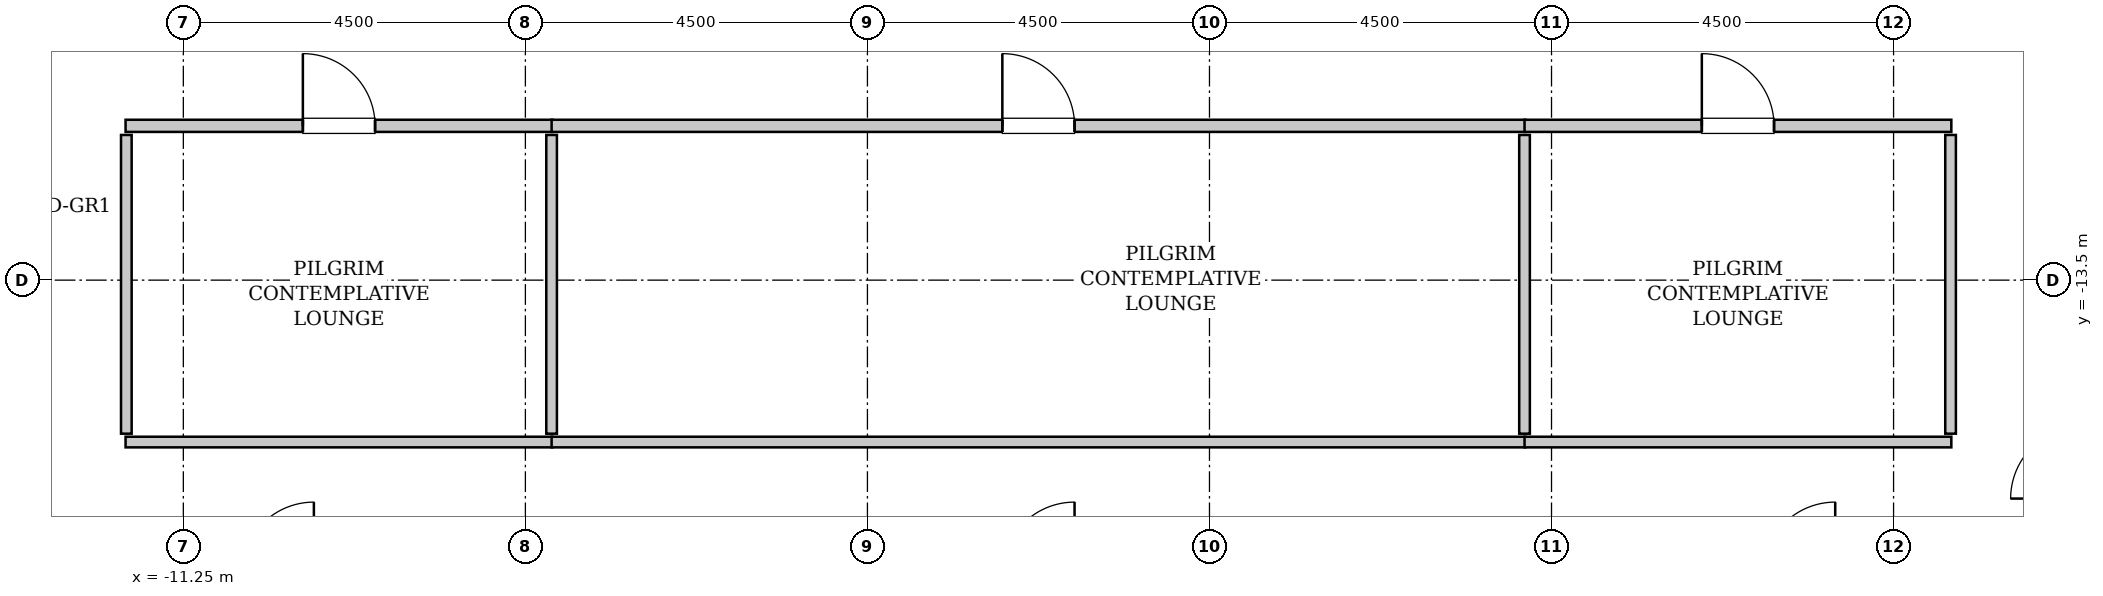
"""IFC4 building model, lengths in metres.
Left out: names, types, materials, properties, quantities, classifications, styles, units other than length and angle.
Written with IfcOpenShell. Run it as: python <this file> out.ifc"""

import sys

from ifc_helpers import new_model, si_unit, direction, frame, frame_2d, origin, place, context, subcontext, project, spatial, rectangle, extrude, source, transform, mapped, element, fill, save


model = new_model("IFC4")
c1 = context("Model", 3, precision=1e-05, world=origin(), true_north=direction((0.0, 1.0)))
c2 = subcontext(c1, "Body", "Model", "MODEL_VIEW")
j1 = project(units=[si_unit("LENGTHUNIT", "METRE"), si_unit("PLANEANGLEUNIT", "RADIAN")], contexts=[c1])
p1 = place(None, origin())
s1 = spatial("IfcSite", under=j1, at=p1, CompositionType="ELEMENT")
p2 = place(p1, origin())
s2 = spatial("IfcBuilding", under=s1, at=p2, CompositionType="ELEMENT")
p3 = place(p2, frame((0.0, 0.0, 186.8)))
s3 = spatial("IfcBuildingStorey", under=s2, at=p3, CompositionType="ELEMENT", Elevation=186.8)
m1 = source(origin(), c2, "Body", "SweptSolid", [
    extrude(rectangle(XDim=5.615, YDim=0.16, at=frame_2d((2.808, 0.0))), origin(), (0.0, 0.0, 1.0), 3.535),
])
p4 = place(p3, frame((-12.01, -11.47, 0.0), z_axis=(0.0, 0.0, 1.0), x_axis=(1.0, 0.0, 0.0)))
e1 = element("IfcWall", 1, at=p4, inside=s3, PredefinedType="PARTITIONING", context=c2, shape_type="MappedRepresentation", body=[
    mapped(m1, transform((0.0, 0.0, 0.0), x_axis=(1.0, 0.0, 0.0), y_axis=(0.0, 1.0, 0.0), z_axis=(0.0, 0.0, 1.0), scale=1.0)),
])
p5 = place(p4, frame((2.333, 0.0, 0.0)))
e2 = element("IfcOpeningElement", 2, at=p5, cuts=e1, PredefinedType="OPENING", context=c2, shape_type="SweptSolid", body=[
    extrude(rectangle(XDim=0.95, YDim=2.1, at=frame_2d((0.475, 1.05))), frame((0.0, 0.09, 0.0), z_axis=(0.0, -1.0, 0.0), x_axis=(1.0, 0.0, 0.0)), (0.0, 0.0, 1.0), 0.18),
])
m2 = source(origin(), c2, "Body", "SweptSolid", [
    extrude(rectangle(XDim=5.615, YDim=0.14, at=frame_2d((2.808, 0.0))), origin(), (0.0, 0.0, 1.0), 3.535),
])
p6 = place(p3, frame((-12.01, -15.63, 0.0), z_axis=(0.0, 0.0, 1.0), x_axis=(1.0, 0.0, 0.0)))
e3 = element("IfcWall", 3, at=p6, inside=s3, PredefinedType="PARTITIONING", context=c2, shape_type="MappedRepresentation", body=[
    mapped(m2, transform((0.0, 0.0, 0.0), x_axis=(1.0, 0.0, 0.0), y_axis=(0.0, 1.0, 0.0), z_axis=(0.0, 0.0, 1.0), scale=1.0)),
])
m3 = source(origin(), c2, "Body", "SweptSolid", [
    extrude(rectangle(XDim=3.93, YDim=0.14, at=frame_2d((1.965, 0.0))), origin(), (0.0, 0.0, 1.0), 3.535),
])
for number, where, z_axis, x_axis in (
    (4, (-12.0, -15.52, 0.0), (0.0, 0.0, 1.0), (0.0, 1.0, 0.0)),
    (5, (-6.405, -15.52, 0.0), (0.0, 0.0, 1.0), (0.0, 1.0, 0.0)),
):
    element("IfcWall", number, at=place(p3, frame(where, z_axis=z_axis, x_axis=x_axis)), inside=s3, PredefinedType="PARTITIONING", context=c2, shape_type="MappedRepresentation", body=[
        mapped(m3, transform((0.0, 0.0, 0.0), x_axis=(1.0, 0.0, 0.0), y_axis=(0.0, 1.0, 0.0), z_axis=(0.0, 0.0, 1.0), scale=1.0)),
    ])
m4 = source(origin(), c2, "Body", "SweptSolid", [
    extrude(rectangle(XDim=12.81, YDim=0.16, at=frame_2d((6.405, 0.0))), origin(), (0.0, 0.0, 1.0), 3.535),
])
p7 = place(p3, frame((-6.405, -11.47, 0.0), z_axis=(0.0, 0.0, 1.0), x_axis=(1.0, 0.0, 0.0)))
e6 = element("IfcWall", 6, at=p7, inside=s3, PredefinedType="PARTITIONING", context=c2, shape_type="MappedRepresentation", body=[
    mapped(m4, transform((0.0, 0.0, 0.0), x_axis=(1.0, 0.0, 0.0), y_axis=(0.0, 1.0, 0.0), z_axis=(0.0, 0.0, 1.0), scale=1.0)),
])
p8 = place(p7, frame((5.93, 0.0, 0.0)))
e7 = element("IfcOpeningElement", 7, at=p8, cuts=e6, PredefinedType="OPENING", context=c2, shape_type="SweptSolid", body=[
    extrude(rectangle(XDim=0.95, YDim=2.1, at=frame_2d((0.475, 1.05))), frame((0.0, 0.09, 0.0), z_axis=(0.0, -1.0, 0.0), x_axis=(1.0, 0.0, 0.0)), (0.0, 0.0, 1.0), 0.18),
])
m5 = source(origin(), c2, "Body", "SweptSolid", [
    extrude(rectangle(XDim=12.81, YDim=0.14, at=frame_2d((6.405, 0.0))), origin(), (0.0, 0.0, 1.0), 3.535),
])
p9 = place(p3, frame((-6.405, -15.63, 0.0), z_axis=(0.0, 0.0, 1.0), x_axis=(1.0, 0.0, 0.0)))
e8 = element("IfcWall", 8, at=p9, inside=s3, PredefinedType="PARTITIONING", context=c2, shape_type="MappedRepresentation", body=[
    mapped(m5, transform((0.0, 0.0, 0.0), x_axis=(1.0, 0.0, 0.0), y_axis=(0.0, 1.0, 0.0), z_axis=(0.0, 0.0, 1.0), scale=1.0)),
])
p10 = place(p3, frame((6.395, -15.52, 0.0), z_axis=(0.0, 0.0, 1.0), x_axis=(0.0, 1.0, 0.0)))
e9 = element("IfcWall", 9, at=p10, inside=s3, PredefinedType="PARTITIONING", context=c2, shape_type="MappedRepresentation", body=[
    mapped(m3, transform((0.0, 0.0, 0.0), x_axis=(1.0, 0.0, 0.0), y_axis=(0.0, 1.0, 0.0), z_axis=(0.0, 0.0, 1.0), scale=1.0)),
])
p11 = place(p3, frame((6.395, -11.47, 0.0), z_axis=(0.0, 0.0, 1.0), x_axis=(1.0, 0.0, 0.0)))
e10 = element("IfcWall", 10, at=p11, inside=s3, PredefinedType="PARTITIONING", context=c2, shape_type="MappedRepresentation", body=[
    mapped(m1, transform((0.0, 0.0, 0.0), x_axis=(1.0, 0.0, 0.0), y_axis=(0.0, 1.0, 0.0), z_axis=(0.0, 0.0, 1.0), scale=1.0)),
])
p12 = place(p11, frame((2.333, 0.0, 0.0)))
e11 = element("IfcOpeningElement", 11, at=p12, cuts=e10, PredefinedType="OPENING", context=c2, shape_type="SweptSolid", body=[
    extrude(rectangle(XDim=0.95, YDim=2.1, at=frame_2d((0.475, 1.05))), frame((0.0, 0.09, 0.0), z_axis=(0.0, -1.0, 0.0), x_axis=(1.0, 0.0, 0.0)), (0.0, 0.0, 1.0), 0.18),
])
p13 = place(p3, frame((6.395, -15.63, 0.0), z_axis=(0.0, 0.0, 1.0), x_axis=(1.0, 0.0, 0.0)))
e12 = element("IfcWall", 12, at=p13, inside=s3, PredefinedType="PARTITIONING", context=c2, shape_type="MappedRepresentation", body=[
    mapped(m2, transform((0.0, 0.0, 0.0), x_axis=(1.0, 0.0, 0.0), y_axis=(0.0, 1.0, 0.0), z_axis=(0.0, 0.0, 1.0), scale=1.0)),
])
p14 = place(p3, frame((12.0, -15.52, 0.0), z_axis=(0.0, 0.0, 1.0), x_axis=(0.0, 1.0, 0.0)))
e13 = element("IfcWall", 13, at=p14, inside=s3, PredefinedType="PARTITIONING", context=c2, shape_type="MappedRepresentation", body=[
    mapped(m3, transform((0.0, 0.0, 0.0), x_axis=(1.0, 0.0, 0.0), y_axis=(0.0, 1.0, 0.0), z_axis=(0.0, 0.0, 1.0), scale=1.0)),
])
m6 = source(origin(), c2, "Body", "SweptSolid", [
    extrude(rectangle(XDim=0.95, YDim=2.1, at=frame_2d((0.475, 1.05))), frame((0.0, 0.025, 0.0), z_axis=(0.0, -1.0, 0.0), x_axis=(1.0, 0.0, 0.0)), (0.0, 0.0, 1.0), 0.05),
])
p15 = place(p5, origin())
e14 = element("IfcDoor", 14, at=p15, inside=s3, OperationType="SINGLE_SWING_LEFT", PredefinedType="DOOR", context=c2, shape_type="MappedRepresentation", body=[
    mapped(m6, transform((0.0, 0.0, 0.0), x_axis=(1.0, 0.0, 0.0), y_axis=(0.0, 1.0, 0.0), z_axis=(0.0, 0.0, 1.0), scale=1.0)),
])
fill(e2, e14)
p16 = place(p8, origin())
e15 = element("IfcDoor", 15, at=p16, inside=s3, OperationType="SINGLE_SWING_LEFT", PredefinedType="DOOR", context=c2, shape_type="MappedRepresentation", body=[
    mapped(m6, transform((0.0, 0.0, 0.0), x_axis=(1.0, 0.0, 0.0), y_axis=(0.0, 1.0, 0.0), z_axis=(0.0, 0.0, 1.0), scale=1.0)),
])
fill(e7, e15)
p17 = place(p12, origin())
e16 = element("IfcDoor", 16, at=p17, inside=s3, OperationType="SINGLE_SWING_LEFT", PredefinedType="DOOR", context=c2, shape_type="MappedRepresentation", body=[
    mapped(m6, transform((0.0, 0.0, 0.0), x_axis=(1.0, 0.0, 0.0), y_axis=(0.0, 1.0, 0.0), z_axis=(0.0, 0.0, 1.0), scale=1.0)),
])
fill(e11, e16)
save(model, sys.argv[1])
